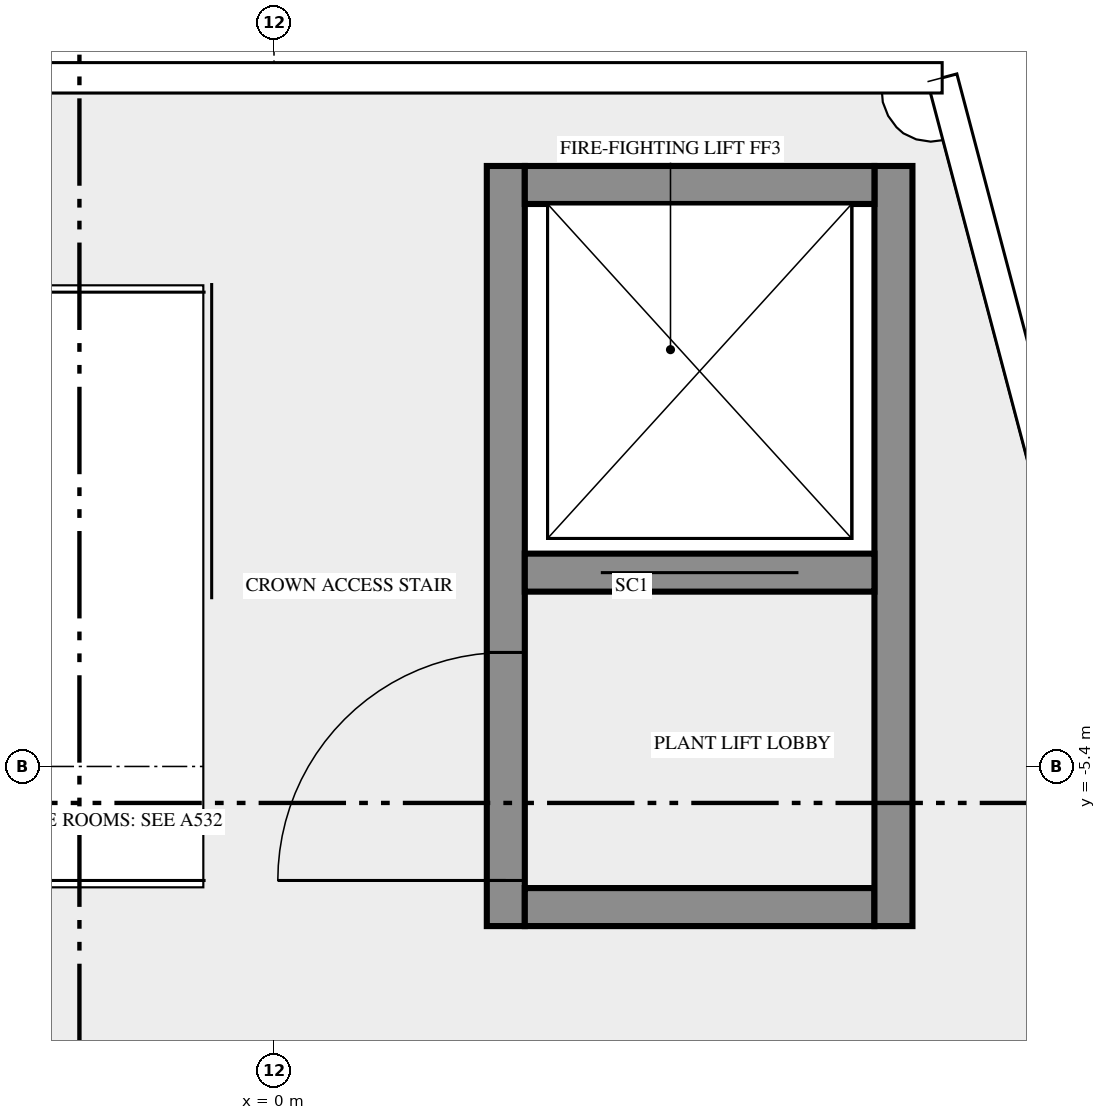
"""IFC4 building model, lengths in metres.
Left out: names, types, materials, properties, quantities, classifications, styles, units other than length and angle.
Written with IfcOpenShell. Run it as: python <this file> out.ifc"""

import sys

from ifc_helpers import new_model, si_unit, direction, frame, frame_2d, origin, place, context, subcontext, project, spatial, rectangle, extrude, element, fill, save


model = new_model("IFC4")
c1 = context("Model", 3, precision=1e-05, world=origin(), true_north=direction((0.0, 1.0)))
c2 = subcontext(c1, "Body", "Model", "MODEL_VIEW")
j1 = project(units=[si_unit("LENGTHUNIT", "METRE"), si_unit("PLANEANGLEUNIT", "RADIAN")], contexts=[c1])
p1 = place(None, origin())
s1 = spatial("IfcSite", under=j1, at=p1, CompositionType="ELEMENT")
p2 = place(p1, origin())
s2 = spatial("IfcBuilding", under=s1, at=p2, CompositionType="ELEMENT")
p3 = place(p2, frame((0.0, 0.0, 392.0)))
s3 = spatial("IfcBuildingStorey", under=s2, at=p3, CompositionType="ELEMENT", Elevation=392.0)
p4 = place(p3, frame((1.525, -6.45, 0.0), z_axis=(0.0, 0.0, 1.0), x_axis=(0.0, 1.0, 0.0)))
e1 = element("IfcWall", 1, at=p4, inside=s3, PredefinedType="SHEAR", context=c2, shape_type="SweptSolid", body=[
    extrude(rectangle(XDim=5.0, YDim=0.25, at=frame_2d((2.5, 0.0))), origin(), (0.0, 0.0, 1.0), 3.7),
])
p5 = place(p4, frame((0.3, 0.0, 0.0)))
e2 = element("IfcOpeningElement", 2, at=p5, cuts=e1, PredefinedType="OPENING", context=c2, shape_type="SweptSolid", body=[
    extrude(rectangle(XDim=1.5, YDim=2.1, at=frame_2d((0.75, 1.05))), frame((0.0, 0.135, 0.0), z_axis=(0.0, -1.0, 0.0), x_axis=(1.0, 0.0, 0.0)), (0.0, 0.0, 1.0), 0.27),
])
p6 = place(p3, frame((1.65, -6.325, 0.0), z_axis=(0.0, 0.0, 1.0), x_axis=(1.0, 0.0, 0.0)))
e3 = element("IfcWall", 3, at=p6, inside=s3, PredefinedType="SHEAR", context=c2, shape_type="SweptSolid", body=[
    extrude(rectangle(XDim=2.3, YDim=0.25, at=frame_2d((1.15, 0.0))), origin(), (0.0, 0.0, 1.0), 3.7),
])
p7 = place(p3, frame((4.075, -6.45, 0.0), z_axis=(0.0, 0.0, 1.0), x_axis=(0.0, 1.0, 0.0)))
e4 = element("IfcWall", 4, at=p7, inside=s3, PredefinedType="SHEAR", context=c2, shape_type="SweptSolid", body=[
    extrude(rectangle(XDim=5.0, YDim=0.25, at=frame_2d((2.5, 0.0))), origin(), (0.0, 0.0, 1.0), 3.7),
])
p8 = place(p3, frame((1.65, -4.125, 0.0), z_axis=(0.0, 0.0, 1.0), x_axis=(1.0, 0.0, 0.0)))
e5 = element("IfcWall", 5, at=p8, inside=s3, PredefinedType="SHEAR", context=c2, shape_type="SweptSolid", body=[
    extrude(rectangle(XDim=2.3, YDim=0.25, at=frame_2d((1.15, 0.0))), origin(), (0.0, 0.0, 1.0), 3.7),
])
p9 = place(p8, frame((0.5, 0.0, 0.0)))
e6 = element("IfcOpeningElement", 6, at=p9, cuts=e5, PredefinedType="OPENING", context=c2, shape_type="SweptSolid", body=[
    extrude(rectangle(XDim=1.3, YDim=2.1, at=frame_2d((0.65, 1.05))), frame((0.0, 0.135, 0.0), z_axis=(0.0, -1.0, 0.0), x_axis=(1.0, 0.0, 0.0)), (0.0, 0.0, 1.0), 0.27),
])
p10 = place(p3, frame((1.65, -1.575, 0.0), z_axis=(0.0, 0.0, 1.0), x_axis=(1.0, 0.0, 0.0)))
e7 = element("IfcWall", 7, at=p10, inside=s3, PredefinedType="SHEAR", context=c2, shape_type="SweptSolid", body=[
    extrude(rectangle(XDim=2.3, YDim=0.25, at=frame_2d((1.15, 0.0))), origin(), (0.0, 0.0, 1.0), 3.7),
])
p11 = place(p5, origin())
e8 = element("IfcDoor", 8, at=p11, inside=s3, OperationType="DOUBLE_DOOR_SINGLE_SWING", PredefinedType="DOOR", context=c2, shape_type="SweptSolid", body=[
    extrude(rectangle(XDim=1.5, YDim=2.1, at=frame_2d((0.75, 1.05))), frame((0.0, 0.025, 0.0), z_axis=(0.0, -1.0, 0.0), x_axis=(1.0, 0.0, 0.0)), (0.0, 0.0, 1.0), 0.05),
])
fill(e2, e8)
p12 = place(p9, origin())
e9 = element("IfcDoor", 9, at=p12, inside=s3, OperationType="DOUBLE_DOOR_SLIDING", PredefinedType="DOOR", context=c2, shape_type="SweptSolid", body=[
    extrude(rectangle(XDim=1.3, YDim=2.1, at=frame_2d((0.65, 1.05))), frame((0.0, 0.025, 0.0), z_axis=(0.0, -1.0, 0.0), x_axis=(1.0, 0.0, 0.0)), (0.0, 0.0, 1.0), 0.05),
])
fill(e6, e9)
save(model, sys.argv[1])
